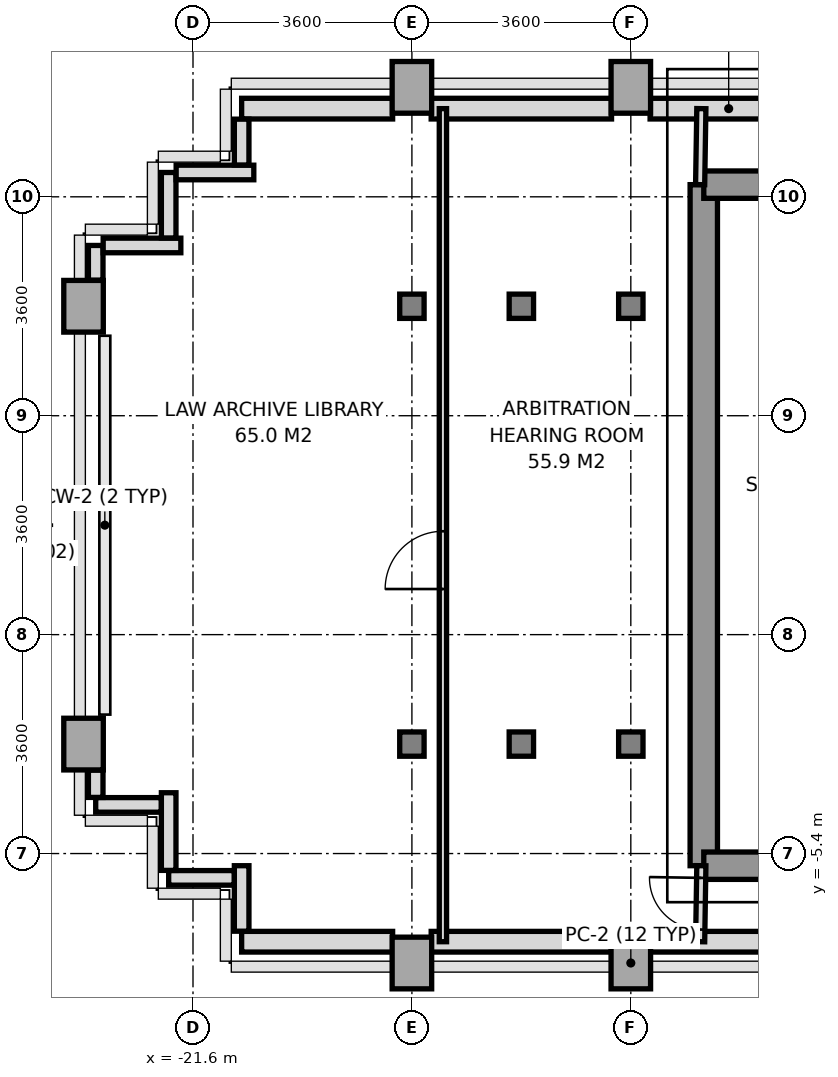
"""IFC4 building model, lengths in metres.
Left out: names, types, materials, properties, quantities, classifications, styles, units other than length and angle.
Written with IfcOpenShell. Run it as: python <this file> out.ifc"""

import sys

from ifc_helpers import new_model, si_unit, direction, frame, frame_2d, origin, origin_2d, place, context, subcontext, project, spatial, rectangle, i_section, extrude, source, transform, mapped, element, fill, save


model = new_model("IFC4")
c1 = context("Model", 3, precision=1e-05, world=origin(), true_north=direction((0.0, 1.0)))
c2 = subcontext(c1, "Body", "Model", "MODEL_VIEW")
j1 = project(units=[si_unit("LENGTHUNIT", "METRE"), si_unit("PLANEANGLEUNIT", "RADIAN")], contexts=[c1])
p1 = place(None, origin())
s1 = spatial("IfcSite", under=j1, at=p1, CompositionType="ELEMENT")
p2 = place(p1, origin())
s2 = spatial("IfcBuilding", under=s1, at=p2, CompositionType="ELEMENT")
p3 = place(p2, frame((0.0, 0.0, 138.0)))
s3 = spatial("IfcBuildingStorey", under=s2, at=p3, CompositionType="ELEMENT", Elevation=138.0)
m1 = source(origin(), c2, "Body", "SweptSolid", [
    extrude(rectangle(XDim=0.65, YDim=0.85, at=origin_2d()), origin(), (0.0, 0.0, 1.0), 3.2),
])
for number, where, z_axis, x_axis in (
    (1, (-23.4, -3.6, 0.0), (0.0, 0.0, 1.0), (1.0, 0.0, 0.0)),
    (2, (-23.4, 3.6, 0.0), (0.0, 0.0, 1.0), (1.0, 0.0, 0.0)),
    (3, (-18.0, -7.2, 0.0), (0.0, 0.0, 1.0), (1.0, 0.0, 0.0)),
):
    element("IfcColumn", number, at=place(p3, frame(where, z_axis=z_axis, x_axis=x_axis)), inside=s3, PredefinedType="COLUMN", context=c2, shape_type="MappedRepresentation", body=[
        mapped(m1, transform((0.0, 0.0, 0.0), x_axis=(1.0, 0.0, 0.0), y_axis=(0.0, 1.0, 0.0), z_axis=(0.0, 0.0, 1.0), scale=1.0)),
    ])
m2 = source(origin(), c2, "Body", "SweptSolid", [
    extrude(i_section(OverallWidth=0.401, OverallDepth=0.399, WebThickness=0.02, FlangeThickness=0.032, at=origin_2d()), origin(), (0.0, 0.0, 1.0), 3.2),
])
for number, where, z_axis, x_axis in (
    (4, (-18.0, -3.6, 0.0), (0.0, 0.0, 1.0), (1.0, 0.0, 0.0)),
    (5, (-18.0, 3.6, 0.0), (0.0, 0.0, 1.0), (1.0, 0.0, 0.0)),
):
    element("IfcColumn", number, at=place(p3, frame(where, z_axis=z_axis, x_axis=x_axis)), inside=s3, PredefinedType="COLUMN", context=c2, shape_type="MappedRepresentation", body=[
        mapped(m2, transform((0.0, 0.0, 0.0), x_axis=(1.0, 0.0, 0.0), y_axis=(0.0, 1.0, 0.0), z_axis=(0.0, 0.0, 1.0), scale=1.0)),
    ])
p4 = place(p3, frame((-18.0, 7.2, 0.0), z_axis=(0.0, 0.0, 1.0), x_axis=(1.0, 0.0, 0.0)))
e6 = element("IfcColumn", 6, at=p4, inside=s3, PredefinedType="COLUMN", context=c2, shape_type="MappedRepresentation", body=[
    mapped(m1, transform((0.0, 0.0, 0.0), x_axis=(1.0, 0.0, 0.0), y_axis=(0.0, 1.0, 0.0), z_axis=(0.0, 0.0, 1.0), scale=1.0)),
])
for number, where, z_axis, x_axis in (
    (7, (-16.2, -3.6, 0.0), (0.0, 0.0, 1.0), (1.0, 0.0, 0.0)),
    (8, (-16.2, 3.6, 0.0), (0.0, 0.0, 1.0), (1.0, 0.0, 0.0)),
):
    element("IfcColumn", number, at=place(p3, frame(where, z_axis=z_axis, x_axis=x_axis)), inside=s3, PredefinedType="COLUMN", context=c2, shape_type="MappedRepresentation", body=[
        mapped(m2, transform((0.0, 0.0, 0.0), x_axis=(1.0, 0.0, 0.0), y_axis=(0.0, 1.0, 0.0), z_axis=(0.0, 0.0, 1.0), scale=1.0)),
    ])
p5 = place(p3, frame((-14.4, -7.2, 0.0), z_axis=(0.0, 0.0, 1.0), x_axis=(1.0, 0.0, 0.0)))
e9 = element("IfcColumn", 9, at=p5, inside=s3, PredefinedType="COLUMN", context=c2, shape_type="MappedRepresentation", body=[
    mapped(m1, transform((0.0, 0.0, 0.0), x_axis=(1.0, 0.0, 0.0), y_axis=(0.0, 1.0, 0.0), z_axis=(0.0, 0.0, 1.0), scale=1.0)),
])
for number, where, z_axis, x_axis in (
    (10, (-14.4, -3.6, 0.0), (0.0, 0.0, 1.0), (1.0, 0.0, 0.0)),
    (11, (-14.4, 3.6, 0.0), (0.0, 0.0, 1.0), (1.0, 0.0, 0.0)),
):
    element("IfcColumn", number, at=place(p3, frame(where, z_axis=z_axis, x_axis=x_axis)), inside=s3, PredefinedType="COLUMN", context=c2, shape_type="MappedRepresentation", body=[
        mapped(m2, transform((0.0, 0.0, 0.0), x_axis=(1.0, 0.0, 0.0), y_axis=(0.0, 1.0, 0.0), z_axis=(0.0, 0.0, 1.0), scale=1.0)),
    ])
p6 = place(p3, frame((-14.4, 7.2, 0.0), z_axis=(0.0, 0.0, 1.0), x_axis=(1.0, 0.0, 0.0)))
e12 = element("IfcColumn", 12, at=p6, inside=s3, PredefinedType="COLUMN", context=c2, shape_type="MappedRepresentation", body=[
    mapped(m1, transform((0.0, 0.0, 0.0), x_axis=(1.0, 0.0, 0.0), y_axis=(0.0, 1.0, 0.0), z_axis=(0.0, 0.0, 1.0), scale=1.0)),
])
p7 = place(p3, frame((-20.8, 6.85, 0.0), z_axis=(0.0, 0.0, 1.0), x_axis=(1.0, 0.0, 0.0)))
e13 = element("IfcWall", 13, at=p7, inside=s3, PredefinedType="SOLIDWALL", context=c2, shape_type="SweptSolid", body=[
    extrude(rectangle(XDim=2.483, YDim=0.34, at=frame_2d((1.242, 0.0))), origin(), (0.0, 0.0, 1.0), 3.2),
])
p8 = place(p3, frame((-17.683, 6.85, 0.0), z_axis=(0.0, 0.0, 1.0), x_axis=(1.0, 0.0, 0.0)))
e14 = element("IfcWall", 14, at=p8, inside=s3, PredefinedType="SOLIDWALL", context=c2, shape_type="SweptSolid", body=[
    extrude(rectangle(XDim=2.966, YDim=0.34, at=frame_2d((1.483, 0.0))), origin(), (0.0, 0.0, 1.0), 2.45),
])
p9 = place(p3, frame((-14.083, 6.85, 0.0), z_axis=(0.0, 0.0, 1.0), x_axis=(1.0, 0.0, 0.0)))
e15 = element("IfcWall", 15, at=p9, inside=s3, PredefinedType="SOLIDWALL", context=c2, shape_type="SweptSolid", body=[
    extrude(rectangle(XDim=2.585, YDim=0.34, at=frame_2d((1.292, 0.0))), origin(), (0.0, 0.0, 1.0), 3.2),
])
p10 = place(p3, frame((-20.8, -6.85, 0.0), z_axis=(0.0, 0.0, 1.0), x_axis=(1.0, 0.0, 0.0)))
e16 = element("IfcWall", 16, at=p10, inside=s3, PredefinedType="SOLIDWALL", context=c2, shape_type="SweptSolid", body=[
    extrude(rectangle(XDim=2.483, YDim=0.34, at=frame_2d((1.242, 0.0))), origin(), (0.0, 0.0, 1.0), 3.2),
])
p11 = place(p3, frame((-17.683, -6.85, 0.0), z_axis=(0.0, 0.0, 1.0), x_axis=(1.0, 0.0, 0.0)))
e17 = element("IfcWall", 17, at=p11, inside=s3, PredefinedType="SOLIDWALL", context=c2, shape_type="SweptSolid", body=[
    extrude(rectangle(XDim=2.966, YDim=0.34, at=frame_2d((1.483, 0.0))), origin(), (0.0, 0.0, 1.0), 2.45),
])
p12 = place(p3, frame((-14.083, -6.85, 0.0), z_axis=(0.0, 0.0, 1.0), x_axis=(1.0, 0.0, 0.0)))
e18 = element("IfcWall", 18, at=p12, inside=s3, PredefinedType="SOLIDWALL", context=c2, shape_type="SweptSolid", body=[
    extrude(rectangle(XDim=2.333, YDim=0.34, at=frame_2d((1.167, 0.0))), origin(), (0.0, 0.0, 1.0), 3.2),
])
for number, where, z_axis, x_axis in (
    (19, (-20.8, -6.677, 0.0), (0.0, 0.0, 1.0), (0.0, 1.0, 0.0)),
    (20, (-20.923, -5.8, 0.0), (0.0, 0.0, 1.0), (-1.0, 0.0, 0.0)),
):
    element("IfcWall", number, at=place(p3, frame(where, z_axis=z_axis, x_axis=x_axis)), inside=s3, PredefinedType="PARAPET", context=c2, shape_type="SweptSolid", body=[
        extrude(rectangle(XDim=1.077, YDim=0.24, at=frame_2d((0.539, 0.0))), origin(), (0.0, 0.0, 1.0), 1.15),
    ])
p13 = place(p3, frame((-22.0, -5.677, 0.0), z_axis=(0.0, 0.0, 1.0), x_axis=(0.0, 1.0, 0.0)))
e21 = element("IfcWall", 21, at=p13, inside=s3, PredefinedType="PARAPET", context=c2, shape_type="SweptSolid", body=[
    extrude(rectangle(XDim=1.277, YDim=0.24, at=frame_2d((0.639, 0.0))), origin(), (0.0, 0.0, 1.0), 1.15),
])
p14 = place(p3, frame((-22.123, -4.6, 0.0), z_axis=(0.0, 0.0, 1.0), x_axis=(-1.0, 0.0, 0.0)))
e22 = element("IfcWall", 22, at=p14, inside=s3, PredefinedType="PARAPET", context=c2, shape_type="SweptSolid", body=[
    extrude(rectangle(XDim=1.077, YDim=0.24, at=frame_2d((0.539, 0.0))), origin(), (0.0, 0.0, 1.0), 1.15),
])
p15 = place(p3, frame((-23.2, -4.477, 0.0), z_axis=(0.0, 0.0, 1.0), x_axis=(0.0, 1.0, 0.0)))
e23 = element("IfcWall", 23, at=p15, inside=s3, PredefinedType="PARAPET", context=c2, shape_type="SweptSolid", body=[
    extrude(rectangle(XDim=0.449, YDim=0.24, at=frame_2d((0.225, 0.0))), origin(), (0.0, 0.0, 1.0), 1.15),
])
p16 = place(p3, frame((-23.2, 4.028, 0.0), z_axis=(0.0, 0.0, 1.0), x_axis=(0.0, 1.0, 0.0)))
e24 = element("IfcWall", 24, at=p16, inside=s3, PredefinedType="PARAPET", context=c2, shape_type="SweptSolid", body=[
    extrude(rectangle(XDim=0.572, YDim=0.24, at=frame_2d((0.286, 0.0))), origin(), (0.0, 0.0, 1.0), 1.15),
])
p17 = place(p3, frame((-23.077, 4.6, 0.0), z_axis=(0.0, 0.0, 1.0), x_axis=(1.0, 0.0, 0.0)))
e25 = element("IfcWall", 25, at=p17, inside=s3, PredefinedType="PARAPET", context=c2, shape_type="SweptSolid", body=[
    extrude(rectangle(XDim=1.277, YDim=0.24, at=frame_2d((0.638, 0.0))), origin(), (0.0, 0.0, 1.0), 1.15),
])
p18 = place(p3, frame((-22.0, 4.723, 0.0), z_axis=(0.0, 0.0, 1.0), x_axis=(0.0, 1.0, 0.0)))
e26 = element("IfcWall", 26, at=p18, inside=s3, PredefinedType="PARAPET", context=c2, shape_type="SweptSolid", body=[
    extrude(rectangle(XDim=1.077, YDim=0.24, at=frame_2d((0.539, 0.0))), origin(), (0.0, 0.0, 1.0), 1.15),
])
p19 = place(p3, frame((-21.877, 5.8, 0.0), z_axis=(0.0, 0.0, 1.0), x_axis=(1.0, 0.0, 0.0)))
e27 = element("IfcWall", 27, at=p19, inside=s3, PredefinedType="PARAPET", context=c2, shape_type="SweptSolid", body=[
    extrude(rectangle(XDim=1.277, YDim=0.24, at=frame_2d((0.638, 0.0))), origin(), (0.0, 0.0, 1.0), 1.15),
])
p20 = place(p3, frame((-20.8, 5.923, 0.0), z_axis=(0.0, 0.0, 1.0), x_axis=(0.0, 1.0, 0.0)))
e28 = element("IfcWall", 28, at=p20, inside=s3, PredefinedType="PARAPET", context=c2, shape_type="SweptSolid", body=[
    extrude(rectangle(XDim=0.754, YDim=0.24, at=frame_2d((0.377, 0.0))), origin(), (0.0, 0.0, 1.0), 1.15),
])
p21 = place(p3, frame((-13.2, -5.6, 0.0), z_axis=(0.0, 0.0, 1.0), x_axis=(0.0, 1.0, 0.0)))
e29 = element("IfcWall", 29, at=p21, inside=s3, PredefinedType="SHEAR", context=c2, shape_type="SweptSolid", body=[
    extrude(rectangle(XDim=11.2, YDim=0.45, at=frame_2d((5.6, 0.0))), origin(), (0.0, 0.0, 1.0), 3.2),
])
p22 = place(p3, frame((-13.2, 5.6, 0.0), z_axis=(0.0, 0.0, 1.0), x_axis=(1.0, 0.0, 0.0)))
e30 = element("IfcWall", 30, at=p22, inside=s3, PredefinedType="SHEAR", context=c2, shape_type="SweptSolid", body=[
    extrude(rectangle(XDim=1.819, YDim=0.45, at=frame_2d((0.909, 0.0))), origin(), (0.0, 0.0, 1.0), 3.2),
])
p23 = place(p3, frame((-13.2, -5.6, 0.0), z_axis=(0.0, 0.0, 1.0), x_axis=(1.0, 0.0, 0.0)))
e31 = element("IfcWall", 31, at=p23, inside=s3, PredefinedType="SHEAR", context=c2, shape_type="SweptSolid", body=[
    extrude(rectangle(XDim=7.8, YDim=0.45, at=frame_2d((3.9, 0.0))), origin(), (0.0, 0.0, 1.0), 3.2),
])
p24 = place(p23, frame((3.6, 0.0, 0.0)))
e32 = element("IfcOpeningElement", 32, at=p24, cuts=e31, PredefinedType="OPENING", context=c2, shape_type="SweptSolid", body=[
    extrude(rectangle(XDim=1.2, YDim=2.2, at=frame_2d((0.6, 1.1))), frame((0.0, 0.235, 0.0), z_axis=(0.0, -1.0, 0.0), x_axis=(1.0, 0.0, 0.0)), (0.0, 0.0, 1.0), 0.47),
])
p25 = place(p3, frame((-13.26, 5.6, 0.0), z_axis=(0.0, 0.0, 1.0), x_axis=(0.016013571389, 0.999871774545, 0.0)))
e33 = element("IfcWall", 33, at=p25, inside=s3, PredefinedType="PARTITIONING", context=c2, shape_type="SweptSolid", body=[
    extrude(rectangle(XDim=1.25, YDim=0.15, at=frame_2d((0.625, 0.0))), origin(), (0.0, 0.0, 1.0), 3.2),
])
p26 = place(p3, frame((-13.26, -6.85, 0.0), z_axis=(0.0, 0.0, 1.0), x_axis=(0.016013571389, 0.999871774545, 0.0)))
e34 = element("IfcWall", 34, at=p26, inside=s3, PredefinedType="PARTITIONING", context=c2, shape_type="SweptSolid", body=[
    extrude(rectangle(XDim=1.25, YDim=0.15, at=frame_2d((0.625, 0.0))), origin(), (0.0, 0.0, 1.0), 3.2),
])
p27 = place(p26, frame((0.2, 0.0, 0.0)))
e35 = element("IfcOpeningElement", 35, at=p27, cuts=e34, PredefinedType="OPENING", context=c2, shape_type="SweptSolid", body=[
    extrude(rectangle(XDim=0.85, YDim=2.1, at=frame_2d((0.425, 1.05))), frame((0.0, 0.085, 0.0), z_axis=(0.0, -1.0, 0.0), x_axis=(1.0, 0.0, 0.0)), (0.0, 0.0, 1.0), 0.17),
])
p28 = place(p3, frame((-17.49, -6.85, 0.0), z_axis=(0.0, 0.0, 1.0), x_axis=(0.0, 1.0, 0.0)))
e36 = element("IfcWall", 36, at=p28, inside=s3, PredefinedType="PARTITIONING", context=c2, shape_type="SweptSolid", body=[
    extrude(rectangle(XDim=13.7, YDim=0.12, at=frame_2d((6.85, 0.0))), origin(), (0.0, 0.0, 1.0), 2.7),
])
p29 = place(p28, frame((5.8, 0.0, 0.0)))
e37 = element("IfcOpeningElement", 37, at=p29, cuts=e36, PredefinedType="OPENING", context=c2, shape_type="SweptSolid", body=[
    extrude(rectangle(XDim=0.95, YDim=2.15, at=frame_2d((0.475, 1.075))), frame((0.0, 0.07, 0.0), z_axis=(0.0, -1.0, 0.0), x_axis=(1.0, 0.0, 0.0)), (0.0, 0.0, 1.0), 0.14),
])
m3 = source(origin(), c2, "Body", "SweptSolid", [
    extrude(rectangle(XDim=0.85, YDim=2.1, at=frame_2d((0.425, 1.05))), frame((0.0, 0.025, 0.0), z_axis=(0.0, -1.0, 0.0), x_axis=(1.0, 0.0, 0.0)), (0.0, 0.0, 1.0), 0.05),
])
p30 = place(p27, origin())
e38 = element("IfcDoor", 38, at=p30, inside=s3, OperationType="SINGLE_SWING_RIGHT", PredefinedType="DOOR", context=c2, shape_type="MappedRepresentation", body=[
    mapped(m3, transform((0.0, 0.0, 0.0), x_axis=(1.0, 0.0, 0.0), y_axis=(0.0, 1.0, 0.0), z_axis=(0.0, 0.0, 1.0), scale=1.0)),
])
fill(e35, e38)
m4 = source(origin(), c2, "Body", "SweptSolid", [
    extrude(rectangle(XDim=0.95, YDim=2.15, at=frame_2d((0.475, 1.075))), frame((0.0, 0.025, 0.0), z_axis=(0.0, -1.0, 0.0), x_axis=(1.0, 0.0, 0.0)), (0.0, 0.0, 1.0), 0.05),
])
p31 = place(p29, origin())
e39 = element("IfcDoor", 39, at=p31, inside=s3, OperationType="SINGLE_SWING_LEFT", PredefinedType="DOOR", context=c2, shape_type="MappedRepresentation", body=[
    mapped(m4, transform((0.0, 0.0, 0.0), x_axis=(1.0, 0.0, 0.0), y_axis=(0.0, 1.0, 0.0), z_axis=(0.0, 0.0, 1.0), scale=1.0)),
])
fill(e37, e39)
save(model, sys.argv[1])
